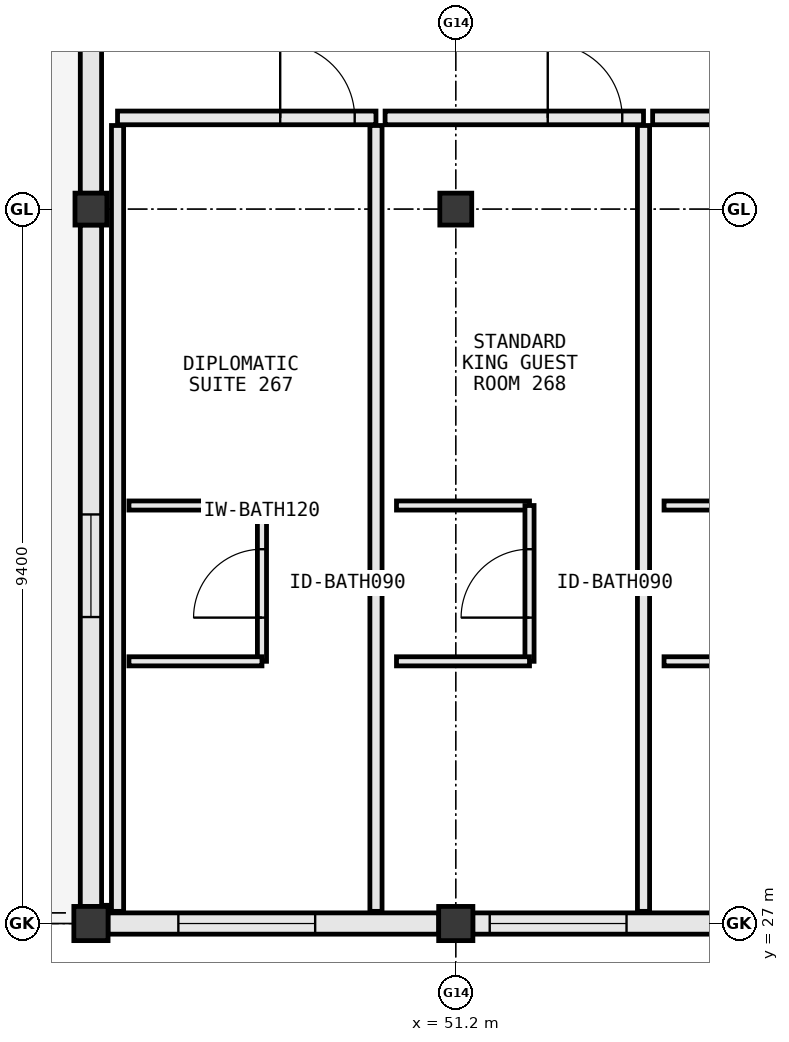
"""IFC4 building model, lengths in metres.
Left out: names, types, materials, properties, quantities, classifications, styles, units other than length and angle.
Written with IfcOpenShell. Run it as: python <this file> out.ifc"""

import sys

from ifc_helpers import new_model, si_unit, direction, frame, frame_2d, origin, origin_2d, place, context, subcontext, project, spatial, rectangle, extrude, element, fill, save


model = new_model("IFC4")
c1 = context("Model", 3, precision=1e-05, world=origin(), true_north=direction((0.0, 1.0)))
c2 = subcontext(c1, "Body", "Model", "MODEL_VIEW")
j1 = project(units=[si_unit("LENGTHUNIT", "METRE"), si_unit("PLANEANGLEUNIT", "RADIAN")], contexts=[c1])
p1 = place(None, origin())
s1 = spatial("IfcSite", under=j1, at=p1, CompositionType="ELEMENT")
p2 = place(p1, origin())
s2 = spatial("IfcBuilding", under=s1, at=p2, CompositionType="ELEMENT")
p3 = place(p2, frame((0.0, 0.0, 39.0)))
s3 = spatial("IfcBuildingStorey", under=s2, at=p3, CompositionType="ELEMENT", Elevation=39.0)
p4 = place(p3, frame((46.4, 27.0, 0.0), z_axis=(0.0, 0.0, 1.0), x_axis=(1.0, 0.0, 0.0)))
e1 = element("IfcColumn", 1, at=p4, inside=s3, PredefinedType="COLUMN", context=c2, shape_type="SweptSolid", body=[
    extrude(rectangle(XDim=0.45, YDim=0.45, at=origin_2d()), origin(), (0.0, 0.0, 1.0), 3.8),
])
p5 = place(p3, frame((46.4, 36.4, 0.0), z_axis=(0.0, 0.0, 1.0), x_axis=(1.0, 0.0, 0.0)))
e2 = element("IfcColumn", 2, at=p5, inside=s3, PredefinedType="COLUMN", context=c2, shape_type="SweptSolid", body=[
    extrude(rectangle(XDim=0.42, YDim=0.42, at=origin_2d()), origin(), (0.0, 0.0, 1.0), 3.8),
])
p6 = place(p3, frame((51.2, 27.0, 0.0), z_axis=(0.0, 0.0, 1.0), x_axis=(1.0, 0.0, 0.0)))
e3 = element("IfcColumn", 3, at=p6, inside=s3, PredefinedType="COLUMN", context=c2, shape_type="SweptSolid", body=[
    extrude(rectangle(XDim=0.45, YDim=0.45, at=origin_2d()), origin(), (0.0, 0.0, 1.0), 3.8),
])
p7 = place(p3, frame((51.2, 36.4, 0.0), z_axis=(0.0, 0.0, 1.0), x_axis=(1.0, 0.0, 0.0)))
e4 = element("IfcColumn", 4, at=p7, inside=s3, PredefinedType="COLUMN", context=c2, shape_type="SweptSolid", body=[
    extrude(rectangle(XDim=0.42, YDim=0.42, at=origin_2d()), origin(), (0.0, 0.0, 1.0), 3.8),
])
p8 = place(p3, frame((46.4, 46.992, 0.0), z_axis=(0.0, 0.0, 1.0), x_axis=(0.0, -1.0, 0.0)))
e5 = element("IfcWall", 5, at=p8, inside=s3, PredefinedType="STANDARD", context=c2, shape_type="SweptSolid", body=[
    extrude(rectangle(XDim=10.384, YDim=0.28, at=frame_2d((5.192, 0.0))), origin(), (0.0, 0.0, 1.0), 2.92),
])
p9 = place(p8, frame((1.921, 0.0, 0.85)))
e6 = element("IfcOpeningElement", 6, at=p9, cuts=e5, PredefinedType="OPENING", context=c2, shape_type="SweptSolid", body=[
    extrude(rectangle(XDim=1.35, YDim=1.65, at=frame_2d((0.675, 0.825))), frame((0.0, 0.152, 0.0), z_axis=(0.0, -1.0, 0.0), x_axis=(1.0, 0.0, 0.0)), (0.0, 0.0, 1.0), 0.304),
])
p10 = place(p8, frame((7.113, 0.0, 0.85)))
e7 = element("IfcOpeningElement", 7, at=p10, cuts=e5, PredefinedType="OPENING", context=c2, shape_type="SweptSolid", body=[
    extrude(rectangle(XDim=1.35, YDim=1.65, at=frame_2d((0.675, 0.825))), frame((0.0, 0.152, 0.0), z_axis=(0.0, -1.0, 0.0), x_axis=(1.0, 0.0, 0.0)), (0.0, 0.0, 1.0), 0.304),
])
p11 = place(p3, frame((46.4, 36.192, 0.0), z_axis=(0.0, 0.0, 1.0), x_axis=(0.0, -1.0, 0.0)))
e8 = element("IfcWall", 8, at=p11, inside=s3, PredefinedType="STANDARD", context=c2, shape_type="SweptSolid", body=[
    extrude(rectangle(XDim=8.969, YDim=0.28, at=frame_2d((4.484, 0.0))), origin(), (0.0, 0.0, 1.0), 2.94),
])
p12 = place(p11, frame((3.81, 0.0, 0.85)))
e9 = element("IfcOpeningElement", 9, at=p12, cuts=e8, PredefinedType="OPENING", context=c2, shape_type="SweptSolid", body=[
    extrude(rectangle(XDim=1.35, YDim=1.65, at=frame_2d((0.675, 0.825))), frame((0.0, 0.152, 0.0), z_axis=(0.0, -1.0, 0.0), x_axis=(1.0, 0.0, 0.0)), (0.0, 0.0, 1.0), 0.304),
])
p13 = place(p3, frame((46.623, 27.0, 0.0), z_axis=(0.0, 0.0, 1.0), x_axis=(1.0, 0.0, 0.0)))
e10 = element("IfcWall", 10, at=p13, inside=s3, PredefinedType="STANDARD", context=c2, shape_type="SweptSolid", body=[
    extrude(rectangle(XDim=4.354, YDim=0.28, at=frame_2d((2.177, 0.0))), origin(), (0.0, 0.0, 1.0), 3.02),
])
p14 = place(p13, frame((0.927, 0.0, 0.85)))
e11 = element("IfcOpeningElement", 11, at=p14, cuts=e10, PredefinedType="OPENING", context=c2, shape_type="SweptSolid", body=[
    extrude(rectangle(XDim=1.8, YDim=1.85, at=frame_2d((0.9, 0.925))), frame((0.0, 0.152, 0.0), z_axis=(0.0, -1.0, 0.0), x_axis=(1.0, 0.0, 0.0)), (0.0, 0.0, 1.0), 0.304),
])
p15 = place(p3, frame((51.423, 27.0, 0.0), z_axis=(0.0, 0.0, 1.0), x_axis=(1.0, 0.0, 0.0)))
e12 = element("IfcWall", 12, at=p15, inside=s3, PredefinedType="STANDARD", context=c2, shape_type="SweptSolid", body=[
    extrude(rectangle(XDim=9.154, YDim=0.28, at=frame_2d((4.577, 0.0))), origin(), (0.0, 0.0, 1.0), 2.84),
])
p16 = place(p15, frame((6.265, 0.0, 0.85)))
e13 = element("IfcOpeningElement", 13, at=p16, cuts=e12, PredefinedType="OPENING", context=c2, shape_type="SweptSolid", body=[
    extrude(rectangle(XDim=1.2, YDim=1.55, at=frame_2d((0.6, 0.775))), frame((0.0, 0.152, 0.0), z_axis=(0.0, -1.0, 0.0), x_axis=(1.0, 0.0, 0.0)), (0.0, 0.0, 1.0), 0.304),
])
p17 = place(p15, frame((0.223, 0.0, 0.85)))
e14 = element("IfcOpeningElement", 14, at=p17, cuts=e12, PredefinedType="OPENING", context=c2, shape_type="SweptSolid", body=[
    extrude(rectangle(XDim=1.8, YDim=1.85, at=frame_2d((0.9, 0.925))), frame((0.0, 0.152, 0.0), z_axis=(0.0, -1.0, 0.0), x_axis=(1.0, 0.0, 0.0)), (0.0, 0.0, 1.0), 0.304),
])
p18 = place(p15, frame((3.167, 0.0, 0.85)))
e15 = element("IfcOpeningElement", 15, at=p18, cuts=e12, PredefinedType="OPENING", context=c2, shape_type="SweptSolid", body=[
    extrude(rectangle(XDim=1.8, YDim=1.85, at=frame_2d((0.9, 0.925))), frame((0.0, 0.152, 0.0), z_axis=(0.0, -1.0, 0.0), x_axis=(1.0, 0.0, 0.0)), (0.0, 0.0, 1.0), 0.304),
])
p19 = place(p3, frame((50.15, 37.6, 0.0), z_axis=(0.0, 0.0, 1.0), x_axis=(-1.0, 0.0, 0.0)))
e16 = element("IfcWall", 16, at=p19, inside=s3, PredefinedType="PARTITIONING", context=c2, shape_type="SweptSolid", body=[
    extrude(rectangle(XDim=3.4, YDim=0.18, at=frame_2d((1.7, 0.0))), origin(), (0.0, 0.0, 1.0), 3.565),
])
p20 = place(p19, frame((0.28, 0.0, 0.0)))
e17 = element("IfcOpeningElement", 17, at=p20, cuts=e16, PredefinedType="OPENING", context=c2, shape_type="SweptSolid", body=[
    extrude(rectangle(XDim=0.98, YDim=2.18, at=frame_2d((0.49, 1.09))), frame((0.0, 0.102, 0.0), z_axis=(0.0, -1.0, 0.0), x_axis=(1.0, 0.0, 0.0)), (0.0, 0.0, 1.0), 0.204),
])
p21 = place(p3, frame((46.75, 27.16, 0.0), z_axis=(0.0, 0.0, 1.0), x_axis=(0.0, 1.0, 0.0)))
e18 = element("IfcWall", 18, at=p21, inside=s3, PredefinedType="PARTITIONING", context=c2, shape_type="SweptSolid", body=[
    extrude(rectangle(XDim=10.34, YDim=0.16, at=frame_2d((5.17, 0.0))), origin(), (0.0, 0.0, 1.0), 2.92),
])
p22 = place(p3, frame((50.15, 27.16, 0.0), z_axis=(0.0, 0.0, 1.0), x_axis=(0.0, 1.0, 0.0)))
e19 = element("IfcWall", 19, at=p22, inside=s3, PredefinedType="PARTITIONING", context=c2, shape_type="SweptSolid", body=[
    extrude(rectangle(XDim=10.34, YDim=0.16, at=frame_2d((5.17, 0.0))), origin(), (0.0, 0.0, 1.0), 3.565),
])
p23 = place(p3, frame((46.9, 32.5, 0.0), z_axis=(0.0, 0.0, 1.0), x_axis=(1.0, 0.0, 0.0)))
e20 = element("IfcWall", 20, at=p23, inside=s3, PredefinedType="PARTITIONING", context=c2, shape_type="SweptSolid", body=[
    extrude(rectangle(XDim=1.75, YDim=0.12, at=frame_2d((0.875, 0.0))), origin(), (0.0, 0.0, 1.0), 3.565),
])
p24 = place(p3, frame((48.65, 30.45, 0.0), z_axis=(0.0, 0.0, 1.0), x_axis=(0.0, 1.0, 0.0)))
e21 = element("IfcWall", 21, at=p24, inside=s3, PredefinedType="PARTITIONING", context=c2, shape_type="SweptSolid", body=[
    extrude(rectangle(XDim=2.05, YDim=0.12, at=frame_2d((1.025, 0.0))), origin(), (0.0, 0.0, 1.0), 3.11),
])
p25 = place(p24, frame((0.575, 0.0, 0.0)))
e22 = element("IfcOpeningElement", 22, at=p25, cuts=e21, PredefinedType="OPENING", context=c2, shape_type="SweptSolid", body=[
    extrude(rectangle(XDim=0.9, YDim=2.15, at=frame_2d((0.45, 1.075))), frame((0.0, 0.072, 0.0), z_axis=(0.0, -1.0, 0.0), x_axis=(1.0, 0.0, 0.0)), (0.0, 0.0, 1.0), 0.144),
])
p26 = place(p3, frame((46.9, 30.45, 0.0), z_axis=(0.0, 0.0, 1.0), x_axis=(1.0, 0.0, 0.0)))
e23 = element("IfcWall", 23, at=p26, inside=s3, PredefinedType="PARTITIONING", context=c2, shape_type="SweptSolid", body=[
    extrude(rectangle(XDim=1.75, YDim=0.12, at=frame_2d((0.875, 0.0))), origin(), (0.0, 0.0, 1.0), 3.565),
])
p27 = place(p3, frame((53.67, 37.6, 0.0), z_axis=(0.0, 0.0, 1.0), x_axis=(-1.0, 0.0, 0.0)))
e24 = element("IfcWall", 24, at=p27, inside=s3, PredefinedType="PARTITIONING", context=c2, shape_type="SweptSolid", body=[
    extrude(rectangle(XDim=3.4, YDim=0.18, at=frame_2d((1.7, 0.0))), origin(), (0.0, 0.0, 1.0), 3.565),
])
p28 = place(p27, frame((0.28, 0.0, 0.0)))
e25 = element("IfcOpeningElement", 25, at=p28, cuts=e24, PredefinedType="OPENING", context=c2, shape_type="SweptSolid", body=[
    extrude(rectangle(XDim=0.98, YDim=2.18, at=frame_2d((0.49, 1.09))), frame((0.0, 0.102, 0.0), z_axis=(0.0, -1.0, 0.0), x_axis=(1.0, 0.0, 0.0)), (0.0, 0.0, 1.0), 0.204),
])
p29 = place(p3, frame((53.67, 27.16, 0.0), z_axis=(0.0, 0.0, 1.0), x_axis=(0.0, 1.0, 0.0)))
e26 = element("IfcWall", 26, at=p29, inside=s3, PredefinedType="PARTITIONING", context=c2, shape_type="SweptSolid", body=[
    extrude(rectangle(XDim=10.34, YDim=0.16, at=frame_2d((5.17, 0.0))), origin(), (0.0, 0.0, 1.0), 3.565),
])
p30 = place(p3, frame((50.42, 32.5, 0.0), z_axis=(0.0, 0.0, 1.0), x_axis=(1.0, 0.0, 0.0)))
e27 = element("IfcWall", 27, at=p30, inside=s3, PredefinedType="PARTITIONING", context=c2, shape_type="SweptSolid", body=[
    extrude(rectangle(XDim=1.75, YDim=0.12, at=frame_2d((0.875, 0.0))), origin(), (0.0, 0.0, 1.0), 3.565),
])
p31 = place(p3, frame((52.17, 30.45, 0.0), z_axis=(0.0, 0.0, 1.0), x_axis=(0.0, 1.0, 0.0)))
e28 = element("IfcWall", 28, at=p31, inside=s3, PredefinedType="PARTITIONING", context=c2, shape_type="SweptSolid", body=[
    extrude(rectangle(XDim=2.05, YDim=0.12, at=frame_2d((1.025, 0.0))), origin(), (0.0, 0.0, 1.0), 3.565),
])
p32 = place(p31, frame((0.575, 0.0, 0.0)))
e29 = element("IfcOpeningElement", 29, at=p32, cuts=e28, PredefinedType="OPENING", context=c2, shape_type="SweptSolid", body=[
    extrude(rectangle(XDim=0.9, YDim=2.15, at=frame_2d((0.45, 1.075))), frame((0.0, 0.072, 0.0), z_axis=(0.0, -1.0, 0.0), x_axis=(1.0, 0.0, 0.0)), (0.0, 0.0, 1.0), 0.144),
])
p33 = place(p3, frame((50.42, 30.45, 0.0), z_axis=(0.0, 0.0, 1.0), x_axis=(1.0, 0.0, 0.0)))
e30 = element("IfcWall", 30, at=p33, inside=s3, PredefinedType="PARTITIONING", context=c2, shape_type="SweptSolid", body=[
    extrude(rectangle(XDim=1.75, YDim=0.12, at=frame_2d((0.875, 0.0))), origin(), (0.0, 0.0, 1.0), 3.565),
])
p34 = place(p3, frame((57.19, 37.6, 0.0), z_axis=(0.0, 0.0, 1.0), x_axis=(-1.0, 0.0, 0.0)))
e31 = element("IfcWall", 31, at=p34, inside=s3, PredefinedType="PARTITIONING", context=c2, shape_type="SweptSolid", body=[
    extrude(rectangle(XDim=3.4, YDim=0.18, at=frame_2d((1.7, 0.0))), origin(), (0.0, 0.0, 1.0), 3.565),
])
p35 = place(p34, frame((0.28, 0.0, 0.0)))
e32 = element("IfcOpeningElement", 32, at=p35, cuts=e31, PredefinedType="OPENING", context=c2, shape_type="SweptSolid", body=[
    extrude(rectangle(XDim=0.98, YDim=2.18, at=frame_2d((0.49, 1.09))), frame((0.0, 0.102, 0.0), z_axis=(0.0, -1.0, 0.0), x_axis=(1.0, 0.0, 0.0)), (0.0, 0.0, 1.0), 0.204),
])
for number, where, z_axis, x_axis in (
    (33, (53.94, 32.5, 0.0), (0.0, 0.0, 1.0), (1.0, 0.0, 0.0)),
    (34, (53.94, 30.45, 0.0), (0.0, 0.0, 1.0), (1.0, 0.0, 0.0)),
):
    element("IfcWall", number, at=place(p3, frame(where, z_axis=z_axis, x_axis=x_axis)), inside=s3, PredefinedType="PARTITIONING", context=c2, shape_type="SweptSolid", body=[
        extrude(rectangle(XDim=1.75, YDim=0.12, at=frame_2d((0.875, 0.0))), origin(), (0.0, 0.0, 1.0), 3.565),
    ])
p36 = place(p12, origin())
e35 = element("IfcWindow", 35, at=p36, inside=s3, PartitioningType="SINGLE_PANEL", PredefinedType="WINDOW", context=c2, shape_type="SweptSolid", body=[
    extrude(rectangle(XDim=1.35, YDim=1.65, at=frame_2d((0.675, 0.825))), frame((0.0, 0.03, 0.0), z_axis=(0.0, -1.0, 0.0), x_axis=(1.0, 0.0, 0.0)), (0.0, 0.0, 1.0), 0.06),
])
fill(e9, e35)
p37 = place(p14, origin())
e36 = element("IfcWindow", 36, at=p37, inside=s3, PartitioningType="SINGLE_PANEL", PredefinedType="WINDOW", context=c2, shape_type="SweptSolid", body=[
    extrude(rectangle(XDim=1.8, YDim=1.85, at=frame_2d((0.9, 0.925))), frame((0.0, 0.03, 0.0), z_axis=(0.0, -1.0, 0.0), x_axis=(1.0, 0.0, 0.0)), (0.0, 0.0, 1.0), 0.06),
])
fill(e11, e36)
p38 = place(p17, origin())
e37 = element("IfcWindow", 37, at=p38, inside=s3, PartitioningType="SINGLE_PANEL", PredefinedType="WINDOW", context=c2, shape_type="SweptSolid", body=[
    extrude(rectangle(XDim=1.8, YDim=1.85, at=frame_2d((0.9, 0.925))), frame((0.0, 0.03, 0.0), z_axis=(0.0, -1.0, 0.0), x_axis=(1.0, 0.0, 0.0)), (0.0, 0.0, 1.0), 0.06),
])
fill(e14, e37)
p39 = place(p20, frame((0.98, 0.0, 0.0), z_axis=(0.0, 0.0, 1.0), x_axis=(-1.0, 0.0, 0.0)))
e38 = element("IfcDoor", 38, at=p39, inside=s3, OperationType="SINGLE_SWING_RIGHT", PredefinedType="DOOR", context=c2, shape_type="SweptSolid", body=[
    extrude(rectangle(XDim=0.98, YDim=2.18, at=frame_2d((0.49, 1.09))), frame((0.0, 0.025, 0.0), z_axis=(0.0, -1.0, 0.0), x_axis=(1.0, 0.0, 0.0)), (0.0, 0.0, 1.0), 0.05),
])
fill(e17, e38)
p40 = place(p25, origin())
e39 = element("IfcDoor", 39, at=p40, inside=s3, OperationType="SINGLE_SWING_LEFT", PredefinedType="DOOR", context=c2, shape_type="SweptSolid", body=[
    extrude(rectangle(XDim=0.9, YDim=2.15, at=frame_2d((0.45, 1.075))), frame((0.0, 0.025, 0.0), z_axis=(0.0, -1.0, 0.0), x_axis=(1.0, 0.0, 0.0)), (0.0, 0.0, 1.0), 0.05),
])
fill(e22, e39)
p41 = place(p28, frame((0.98, 0.0, 0.0), z_axis=(0.0, 0.0, 1.0), x_axis=(-1.0, 0.0, 0.0)))
e40 = element("IfcDoor", 40, at=p41, inside=s3, OperationType="SINGLE_SWING_RIGHT", PredefinedType="DOOR", context=c2, shape_type="SweptSolid", body=[
    extrude(rectangle(XDim=0.98, YDim=2.18, at=frame_2d((0.49, 1.09))), frame((0.0, 0.025, 0.0), z_axis=(0.0, -1.0, 0.0), x_axis=(1.0, 0.0, 0.0)), (0.0, 0.0, 1.0), 0.05),
])
fill(e25, e40)
p42 = place(p32, origin())
e41 = element("IfcDoor", 41, at=p42, inside=s3, OperationType="SINGLE_SWING_LEFT", PredefinedType="DOOR", context=c2, shape_type="SweptSolid", body=[
    extrude(rectangle(XDim=0.9, YDim=2.15, at=frame_2d((0.45, 1.075))), frame((0.0, 0.025, 0.0), z_axis=(0.0, -1.0, 0.0), x_axis=(1.0, 0.0, 0.0)), (0.0, 0.0, 1.0), 0.05),
])
fill(e29, e41)
save(model, sys.argv[1])
